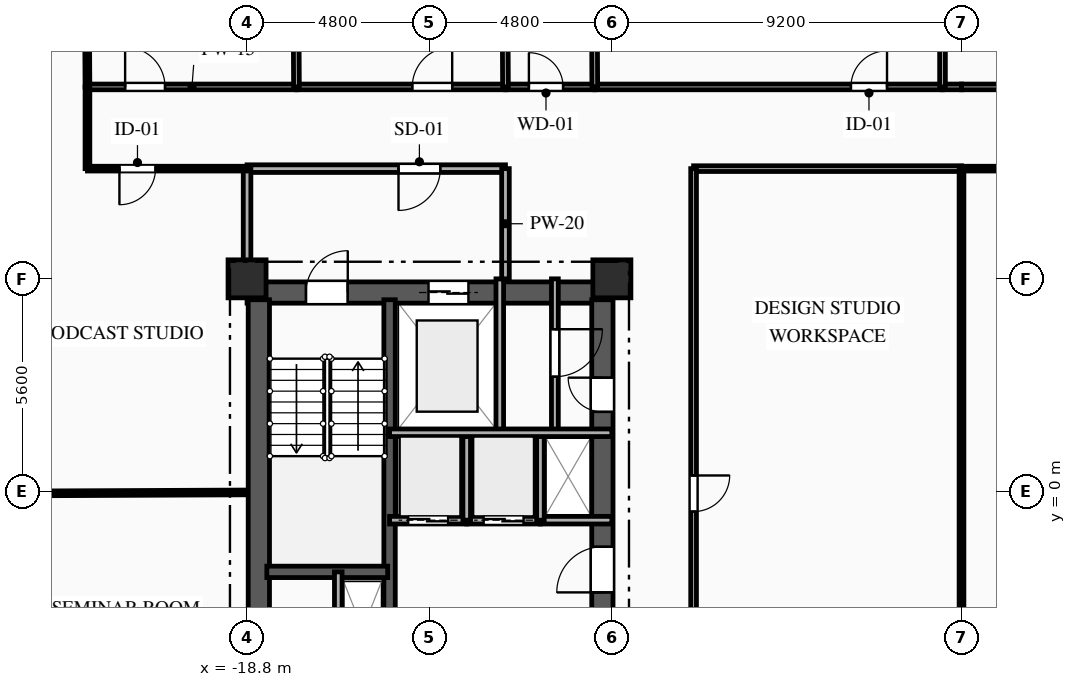
"""IFC4 building model, lengths in metres.
Left out: names, types, materials, properties, quantities, classifications, styles, units other than length and angle.
Written with IfcOpenShell. Run it as: python <this file> out.ifc"""

import sys

from ifc_helpers import new_model, si_unit, direction, frame, frame_2d, origin, origin_2d, place, context, subcontext, project, spatial, rectangle, extrude, element, fill, save


model = new_model("IFC4")
c1 = context("Model", 3, precision=1e-05, world=origin(), true_north=direction((0.0, 1.0)))
c2 = subcontext(c1, "Body", "Model", "MODEL_VIEW")
j1 = project(units=[si_unit("LENGTHUNIT", "METRE"), si_unit("PLANEANGLEUNIT", "RADIAN")], contexts=[c1])
p1 = place(None, origin())
s1 = spatial("IfcSite", under=j1, at=p1, CompositionType="ELEMENT")
p2 = place(p1, origin())
s2 = spatial("IfcBuilding", under=s1, at=p2, CompositionType="ELEMENT")
p3 = place(p2, frame((0.0, 0.0, 112.5)))
s3 = spatial("IfcBuildingStorey", under=s2, at=p3, CompositionType="ELEMENT", Elevation=112.5)
for number, where, z_axis, x_axis in (
    (1, (-18.8, 5.6, 0.0), (0.0, 0.0, 1.0), (1.0, 0.0, 0.0)),
    (2, (-9.2, 5.6, 0.0), (0.0, 0.0, 1.0), (1.0, 0.0, 0.0)),
):
    element("IfcColumn", number, at=place(p3, frame(where, z_axis=z_axis, x_axis=x_axis)), inside=s3, PredefinedType="COLUMN", context=c2, shape_type="SweptSolid", body=[
        extrude(rectangle(XDim=1.0, YDim=1.0, at=origin_2d()), origin(), (0.0, 0.0, 1.0), 3.35),
    ])
p4 = place(p3, frame((-18.8, 5.24, 0.0), z_axis=(0.0, 0.0, 1.0), x_axis=(1.0, 0.0, 0.0)))
e3 = element("IfcWall", 3, at=p4, inside=s3, PredefinedType="SHEAR", context=c2, shape_type="SweptSolid", body=[
    extrude(rectangle(XDim=9.6, YDim=0.56, at=frame_2d((4.8, 0.0))), origin(), (0.0, 0.0, 1.0), 3.045),
])
p5 = place(p4, frame((1.55, 0.0, 0.0)))
e4 = element("IfcOpeningElement", 4, at=p5, cuts=e3, PredefinedType="OPENING", context=c2, shape_type="SweptSolid", body=[
    extrude(rectangle(XDim=1.1, YDim=2.15, at=frame_2d((0.55, 1.075))), frame((0.0, 0.29, 0.0), z_axis=(0.0, -1.0, 0.0), x_axis=(1.0, 0.0, 0.0)), (0.0, 0.0, 1.0), 0.58),
])
p6 = place(p4, frame((4.775, 0.0, 0.0)))
e5 = element("IfcOpeningElement", 5, at=p6, cuts=e3, PredefinedType="OPENING", context=c2, shape_type="SweptSolid", body=[
    extrude(rectangle(XDim=1.05, YDim=2.1, at=frame_2d((0.525, 1.05))), frame((0.0, 0.29, 0.0), z_axis=(0.0, -1.0, 0.0), x_axis=(1.0, 0.0, 0.0)), (0.0, 0.0, 1.0), 0.58),
])
p7 = place(p3, frame((-18.49, -5.05, 0.0), z_axis=(0.0, 0.0, 1.0), x_axis=(0.0, 1.0, 0.0)))
e6 = element("IfcWall", 6, at=p7, inside=s3, PredefinedType="SHEAR", context=c2, shape_type="SweptSolid", body=[
    extrude(rectangle(XDim=10.1, YDim=0.56, at=frame_2d((5.05, 0.0))), origin(), (0.0, 0.0, 1.0), 3.045),
])
p8 = place(p3, frame((-9.45, -5.05, 0.0), z_axis=(0.0, 0.0, 1.0), x_axis=(0.0, 1.0, 0.0)))
e7 = element("IfcWall", 7, at=p8, inside=s3, PredefinedType="SHEAR", context=c2, shape_type="SweptSolid", body=[
    extrude(rectangle(XDim=10.1, YDim=0.56, at=frame_2d((5.05, 0.0))), origin(), (0.0, 0.0, 1.0), 3.045),
])
p9 = place(p8, frame((7.15, 0.0, 0.0)))
e8 = element("IfcOpeningElement", 8, at=p9, cuts=e7, PredefinedType="OPENING", context=c2, shape_type="SweptSolid", body=[
    extrude(rectangle(XDim=0.9, YDim=2.1, at=frame_2d((0.45, 1.05))), frame((0.0, 0.29, 0.0), z_axis=(0.0, -1.0, 0.0), x_axis=(1.0, 0.0, 0.0)), (0.0, 0.0, 1.0), 0.58),
])
p10 = place(p8, frame((2.4, 0.0, 0.0)))
e9 = element("IfcOpeningElement", 9, at=p10, cuts=e7, PredefinedType="OPENING", context=c2, shape_type="SweptSolid", body=[
    extrude(rectangle(XDim=1.2, YDim=2.15, at=frame_2d((0.6, 1.075))), frame((0.0, 0.29, 0.0), z_axis=(0.0, -1.0, 0.0), x_axis=(1.0, 0.0, 0.0)), (0.0, 0.0, 1.0), 0.58),
])
p11 = place(p3, frame((-15.05, -5.05, 0.0), z_axis=(0.0, 0.0, 1.0), x_axis=(0.0, 1.0, 0.0)))
e10 = element("IfcWall", 10, at=p11, inside=s3, PredefinedType="SHEAR", context=c2, shape_type="SweptSolid", body=[
    extrude(rectangle(XDim=10.1, YDim=0.3, at=frame_2d((5.05, 0.0))), origin(), (0.0, 0.0, 1.0), 3.045),
])
p12 = place(p3, frame((-18.28, -2.11, 0.0), z_axis=(0.0, 0.0, 1.0), x_axis=(1.0, 0.0, 0.0)))
e11 = element("IfcWall", 11, at=p12, inside=s3, PredefinedType="SHEAR", context=c2, shape_type="SweptSolid", body=[
    extrude(rectangle(XDim=3.18, YDim=0.3, at=frame_2d((1.59, 0.0))), origin(), (0.0, 0.0, 1.0), 3.045),
])
p13 = place(p3, frame((-16.4, -5.6, 0.0), z_axis=(0.0, 0.0, 1.0), x_axis=(0.0, 1.0, 0.0)))
e12 = element("IfcWall", 12, at=p13, inside=s3, PredefinedType="PARTITIONING", context=c2, shape_type="SweptSolid", body=[
    extrude(rectangle(XDim=3.49, YDim=0.2, at=frame_2d((1.745, 0.0))), origin(), (0.0, 0.0, 1.0), 3.045),
])
p14 = place(p3, frame((-12.15, 1.55, 0.0), z_axis=(0.0, 0.0, 1.0), x_axis=(0.0, 1.0, 0.0)))
e13 = element("IfcWall", 13, at=p14, inside=s3, PredefinedType="PARTITIONING", context=c2, shape_type="SweptSolid", body=[
    extrude(rectangle(XDim=4.05, YDim=0.2, at=frame_2d((2.025, 0.0))), origin(), (0.0, 0.0, 1.0), 3.045),
])
p15 = place(p3, frame((-12.0, 8.5, 0.0), z_axis=(0.0, 0.0, 1.0), x_axis=(-1.0, 0.0, 0.0)))
e14 = element("IfcWall", 14, at=p15, inside=s3, PredefinedType="PARTITIONING", context=c2, shape_type="SweptSolid", body=[
    extrude(rectangle(XDim=6.8, YDim=0.2, at=frame_2d((3.4, 0.0))), origin(), (0.0, 0.0, 1.0), 3.045),
])
p16 = place(p15, frame((1.715, 0.0, 0.0)))
e15 = element("IfcOpeningElement", 15, at=p16, cuts=e14, PredefinedType="OPENING", context=c2, shape_type="SweptSolid", body=[
    extrude(rectangle(XDim=1.1, YDim=2.15, at=frame_2d((0.55, 1.075))), frame((0.0, 0.11, 0.0), z_axis=(0.0, -1.0, 0.0), x_axis=(1.0, 0.0, 0.0)), (0.0, 0.0, 1.0), 0.22),
])
p17 = place(p3, frame((-12.0, 5.6, 0.0), z_axis=(0.0, 0.0, 1.0), x_axis=(0.0, 1.0, 0.0)))
e16 = element("IfcWall", 16, at=p17, inside=s3, PredefinedType="PARTITIONING", context=c2, shape_type="SweptSolid", body=[
    extrude(rectangle(XDim=2.9, YDim=0.2, at=frame_2d((1.45, 0.0))), origin(), (0.0, 0.0, 1.0), 3.045),
])
p18 = place(p3, frame((-18.8, 8.5, 0.0), z_axis=(0.0, 0.0, 1.0), x_axis=(0.0, -1.0, 0.0)))
e17 = element("IfcWall", 17, at=p18, inside=s3, PredefinedType="PARTITIONING", context=c2, shape_type="SweptSolid", body=[
    extrude(rectangle(XDim=2.9, YDim=0.2, at=frame_2d((1.45, 0.0))), origin(), (0.0, 0.0, 1.0), 2.53),
])
p19 = place(p3, frame((-10.7, 5.6, 0.0), z_axis=(0.0, 0.0, 1.0), x_axis=(0.0, -1.0, 0.0)))
e18 = element("IfcWall", 18, at=p19, inside=s3, PredefinedType="PARTITIONING", context=c2, shape_type="SweptSolid", body=[
    extrude(rectangle(XDim=4.05, YDim=0.18, at=frame_2d((2.025, 0.0))), origin(), (0.0, 0.0, 1.0), 3.045),
])
p20 = place(p19, frame((1.325, 0.0, 0.0)))
e19 = element("IfcOpeningElement", 19, at=p20, cuts=e18, PredefinedType="OPENING", context=c2, shape_type="SweptSolid", body=[
    extrude(rectangle(XDim=1.25, YDim=2.2, at=frame_2d((0.625, 1.1))), frame((0.0, 0.1, 0.0), z_axis=(0.0, -1.0, 0.0), x_axis=(1.0, 0.0, 0.0)), (0.0, 0.0, 1.0), 0.2),
])
p21 = place(p3, frame((-13.02, -0.75, 0.0), z_axis=(0.0, 0.0, 1.0), x_axis=(-1.0, 0.0, 0.0)))
e20 = element("IfcWall", 20, at=p21, inside=s3, PredefinedType="PARTITIONING", context=c2, shape_type="SweptSolid", body=[
    extrude(rectangle(XDim=2.03, YDim=0.2, at=frame_2d((1.015, 0.0))), origin(), (0.0, 0.0, 1.0), 3.045),
])
p22 = place(p21, frame((0.49, 0.0, 0.0)))
e21 = element("IfcOpeningElement", 21, at=p22, cuts=e20, PredefinedType="OPENING", context=c2, shape_type="SweptSolid", body=[
    extrude(rectangle(XDim=1.05, YDim=2.1, at=frame_2d((0.525, 1.05))), frame((0.0, 0.11, 0.0), z_axis=(0.0, -1.0, 0.0), x_axis=(1.0, 0.0, 0.0)), (0.0, 0.0, 1.0), 0.22),
])
p23 = place(p3, frame((-11.08, -0.75, 0.0), z_axis=(0.0, 0.0, 1.0), x_axis=(-1.0, 0.0, 0.0)))
e22 = element("IfcWall", 22, at=p23, inside=s3, PredefinedType="PARTITIONING", context=c2, shape_type="SweptSolid", body=[
    extrude(rectangle(XDim=1.94, YDim=0.2, at=frame_2d((0.97, 0.0))), origin(), (0.0, 0.0, 1.0), 3.045),
])
p24 = place(p23, frame((0.445, 0.0, 0.0)))
e23 = element("IfcOpeningElement", 23, at=p24, cuts=e22, PredefinedType="OPENING", context=c2, shape_type="SweptSolid", body=[
    extrude(rectangle(XDim=1.05, YDim=2.1, at=frame_2d((0.525, 1.05))), frame((0.0, 0.11, 0.0), z_axis=(0.0, -1.0, 0.0), x_axis=(1.0, 0.0, 0.0)), (0.0, 0.0, 1.0), 0.22),
])
p25 = place(p3, frame((-9.2, -0.75, 0.0), z_axis=(0.0, 0.0, 1.0), x_axis=(-1.0, 0.0, 0.0)))
e24 = element("IfcWall", 24, at=p25, inside=s3, PredefinedType="PARTITIONING", context=c2, shape_type="SweptSolid", body=[
    extrude(rectangle(XDim=1.88, YDim=0.2, at=frame_2d((0.94, 0.0))), origin(), (0.0, 0.0, 1.0), 3.045),
])
for number, where, z_axis, x_axis in (
    (25, (-13.02, -0.75, 0.0), (0.0, 0.0, 1.0), (0.0, 1.0, 0.0)),
    (26, (-11.08, -0.75, 0.0), (0.0, 0.0, 1.0), (0.0, 1.0, 0.0)),
):
    element("IfcWall", number, at=place(p3, frame(where, z_axis=z_axis, x_axis=x_axis)), inside=s3, PredefinedType="PARTITIONING", context=c2, shape_type="SweptSolid", body=[
        extrude(rectangle(XDim=2.3, YDim=0.2, at=frame_2d((1.15, 0.0))), origin(), (0.0, 0.0, 1.0), 3.045),
    ])
p26 = place(p3, frame((-18.8, 8.5, 0.0), z_axis=(0.0, 0.0, 1.0), x_axis=(-1.0, 0.0, 0.0)))
e27 = element("IfcWall", 27, at=p26, inside=s3, PredefinedType="PARTITIONING", context=c2, shape_type="SweptSolid", body=[
    extrude(rectangle(XDim=4.2, YDim=0.125, at=frame_2d((2.1, 0.0))), origin(), (0.0, 0.0, 1.0), 3.045),
])
p27 = place(p26, frame((2.409, 0.0, 0.0)))
e28 = element("IfcOpeningElement", 28, at=p27, cuts=e27, PredefinedType="OPENING", context=c2, shape_type="SweptSolid", body=[
    extrude(rectangle(XDim=0.95, YDim=2.1, at=frame_2d((0.475, 1.05))), frame((0.0, 0.073, 0.0), z_axis=(0.0, -1.0, 0.0), x_axis=(1.0, 0.0, 0.0)), (0.0, 0.0, 1.0), 0.145),
])
p28 = place(p3, frame((-23.0, 8.5, 0.0), z_axis=(0.0, 0.0, 1.0), x_axis=(0.0, 1.0, 0.0)))
e29 = element("IfcWall", 29, at=p28, inside=s3, PredefinedType="PARTITIONING", context=c2, shape_type="SweptSolid", body=[
    extrude(rectangle(XDim=2.15, YDim=0.125, at=frame_2d((1.075, 0.0))), origin(), (0.0, 0.0, 1.0), 3.045),
])
p29 = place(p3, frame((-23.0, 10.65, 0.0), z_axis=(0.0, 0.0, 1.0), x_axis=(1.0, 0.0, 0.0)))
e30 = element("IfcWall", 30, at=p29, inside=s3, PredefinedType="PARTITIONING", context=c2, shape_type="SweptSolid", body=[
    extrude(rectangle(XDim=5.5, YDim=0.15, at=frame_2d((2.75, 0.0))), origin(), (0.0, 0.0, 1.0), 3.045),
])
p30 = place(p29, frame((0.991, 0.0, 0.0)))
e31 = element("IfcOpeningElement", 31, at=p30, cuts=e30, PredefinedType="OPENING", context=c2, shape_type="SweptSolid", body=[
    extrude(rectangle(XDim=1.05, YDim=2.15, at=frame_2d((0.525, 1.075))), frame((0.0, 0.085, 0.0), z_axis=(0.0, -1.0, 0.0), x_axis=(1.0, 0.0, 0.0)), (0.0, 0.0, 1.0), 0.17),
])
p31 = place(p3, frame((-17.5, 10.65, 0.0), z_axis=(0.0, 0.0, 1.0), x_axis=(1.0, 0.0, 0.0)))
e32 = element("IfcWall", 32, at=p31, inside=s3, PredefinedType="PARTITIONING", context=c2, shape_type="SweptSolid", body=[
    extrude(rectangle(XDim=5.5, YDim=0.15, at=frame_2d((2.75, 0.0))), origin(), (0.0, 0.0, 1.0), 3.045),
])
p32 = place(p31, frame((3.048, 0.0, 0.0)))
e33 = element("IfcOpeningElement", 33, at=p32, cuts=e32, PredefinedType="OPENING", context=c2, shape_type="SweptSolid", body=[
    extrude(rectangle(XDim=1.05, YDim=2.15, at=frame_2d((0.525, 1.075))), frame((0.0, 0.085, 0.0), z_axis=(0.0, -1.0, 0.0), x_axis=(1.0, 0.0, 0.0)), (0.0, 0.0, 1.0), 0.17),
])
p33 = place(p3, frame((-12.0, 10.65, 0.0), z_axis=(0.0, 0.0, 1.0), x_axis=(1.0, 0.0, 0.0)))
e34 = element("IfcWall", 34, at=p33, inside=s3, PredefinedType="PLUMBINGWALL", context=c2, shape_type="SweptSolid", body=[
    extrude(rectangle(XDim=2.35, YDim=0.15, at=frame_2d((1.175, 0.0))), origin(), (0.0, 0.0, 1.0), 3.045),
])
p34 = place(p33, frame((0.616, 0.0, 0.0)))
e35 = element("IfcOpeningElement", 35, at=p34, cuts=e34, PredefinedType="OPENING", context=c2, shape_type="SweptSolid", body=[
    extrude(rectangle(XDim=0.9, YDim=2.1, at=frame_2d((0.45, 1.05))), frame((0.0, 0.085, 0.0), z_axis=(0.0, -1.0, 0.0), x_axis=(1.0, 0.0, 0.0)), (0.0, 0.0, 1.0), 0.17),
])
p35 = place(p3, frame((-9.65, 10.65, 0.0), z_axis=(0.0, 0.0, 1.0), x_axis=(1.0, 0.0, 0.0)))
e36 = element("IfcWall", 36, at=p35, inside=s3, PredefinedType="PARTITIONING", context=c2, shape_type="SweptSolid", body=[
    extrude(rectangle(XDim=9.15, YDim=0.15, at=frame_2d((4.575, 0.0))), origin(), (0.0, 0.0, 1.0), 3.045),
])
p36 = place(p35, frame((6.74, 0.0, 0.0)))
e37 = element("IfcOpeningElement", 37, at=p36, cuts=e36, PredefinedType="OPENING", context=c2, shape_type="SweptSolid", body=[
    extrude(rectangle(XDim=0.95, YDim=2.1, at=frame_2d((0.475, 1.05))), frame((0.0, 0.085, 0.0), z_axis=(0.0, -1.0, 0.0), x_axis=(1.0, 0.0, 0.0)), (0.0, 0.0, 1.0), 0.17),
])
p37 = place(p3, frame((-0.5, 10.65, 0.0), z_axis=(0.0, 0.0, 1.0), x_axis=(1.0, 0.0, 0.0)))
e38 = element("IfcWall", 38, at=p37, inside=s3, PredefinedType="PLUMBINGWALL", context=c2, shape_type="SweptSolid", body=[
    extrude(rectangle(XDim=0.5, YDim=0.15, at=frame_2d((0.25, 0.0))), origin(), (0.0, 0.0, 1.0), 3.045),
])
p38 = place(p3, frame((0.0, 8.5, 0.0), z_axis=(0.0, 0.0, 1.0), x_axis=(-1.0, 0.0, 0.0)))
e39 = element("IfcWall", 39, at=p38, inside=s3, PredefinedType="PARTITIONING", context=c2, shape_type="SweptSolid", body=[
    extrude(rectangle(XDim=7.05, YDim=0.15, at=frame_2d((3.525, 0.0))), origin(), (0.0, 0.0, 1.0), 3.045),
])
p39 = place(p3, frame((0.0, 10.65, 0.0), z_axis=(0.0, 0.0, 1.0), x_axis=(1.0, 0.0, 0.0)))
e40 = element("IfcWall", 40, at=p39, inside=s3, PredefinedType="PLUMBINGWALL", context=c2, shape_type="SweptSolid", body=[
    extrude(rectangle(XDim=1.95, YDim=0.15, at=frame_2d((0.975, 0.0))), origin(), (0.0, 0.0, 1.0), 3.045),
])
p40 = place(p3, frame((7.05, 8.5, 0.0), z_axis=(0.0, 0.0, 1.0), x_axis=(-1.0, 0.0, 0.0)))
e41 = element("IfcWall", 41, at=p40, inside=s3, PredefinedType="PARTITIONING", context=c2, shape_type="SweptSolid", body=[
    extrude(rectangle(XDim=7.05, YDim=0.125, at=frame_2d((3.525, 0.0))), origin(), (0.0, 0.0, 1.0), 3.045),
])
p41 = place(p3, frame((-7.05, 8.5, 0.0), z_axis=(0.0, 0.0, 1.0), x_axis=(0.0, -1.0, 0.0)))
e42 = element("IfcWall", 42, at=p41, inside=s3, PredefinedType="PARTITIONING", context=c2, shape_type="SweptSolid", body=[
    extrude(rectangle(XDim=14.1, YDim=0.15, at=frame_2d((7.05, 0.0))), origin(), (0.0, 0.0, 1.0), 3.045),
])
p42 = place(p41, frame((8.074, 0.0, 0.0)))
e43 = element("IfcOpeningElement", 43, at=p42, cuts=e42, PredefinedType="OPENING", context=c2, shape_type="SweptSolid", body=[
    extrude(rectangle(XDim=0.95, YDim=2.1, at=frame_2d((0.475, 1.05))), frame((0.0, 0.085, 0.0), z_axis=(0.0, -1.0, 0.0), x_axis=(1.0, 0.0, 0.0)), (0.0, 0.0, 1.0), 0.17),
])
p43 = place(p3, frame((-28.671, -0.064, 0.0), z_axis=(0.0, 0.0, 1.0), x_axis=(0.999990089865, 0.004451985263, 0.0)))
e44 = element("IfcWall", 44, at=p43, inside=s3, PredefinedType="PARTITIONING", context=c2, shape_type="SweptSolid", body=[
    extrude(rectangle(XDim=9.871, YDim=0.125, at=frame_2d((4.936, 0.0))), origin(), (0.0, 0.0, 1.0), 3.045),
])
p44 = place(p3, frame((-23.044, 18.013, 0.0), z_axis=(0.0, 0.0, 1.0), x_axis=(0.005968459246, -0.999982188588, 0.0)))
e45 = element("IfcWall", 45, at=p44, inside=s3, PredefinedType="PARTITIONING", context=c2, shape_type="SweptSolid", body=[
    extrude(rectangle(XDim=7.363, YDim=0.125, at=frame_2d((3.682, 0.0))), origin(), (0.0, 0.0, 1.0), 3.045),
])
p45 = place(p3, frame((-17.544, 18.591, 0.0), z_axis=(0.0, 0.0, 1.0), x_axis=(0.005533949572, -0.999984687584, 0.0)))
e46 = element("IfcWall", 46, at=p45, inside=s3, PredefinedType="PARTITIONING", context=c2, shape_type="SweptSolid", body=[
    extrude(rectangle(XDim=7.941, YDim=0.15, at=frame_2d((3.97, 0.0))), origin(), (0.0, 0.0, 1.0), 2.53),
])
p46 = place(p3, frame((-12.044, 19.169, 0.0), z_axis=(0.0, 0.0, 1.0), x_axis=(0.005158411336, -0.999986695308, 0.0)))
e47 = element("IfcWall", 47, at=p46, inside=s3, PredefinedType="PLUMBINGWALL", context=c2, shape_type="SweptSolid", body=[
    extrude(rectangle(XDim=8.519, YDim=0.15, at=frame_2d((4.26, 0.0))), origin(), (0.0, 0.0, 1.0), 3.045),
])
p47 = place(p3, frame((-9.694, 19.416, 0.0), z_axis=(0.0, 0.0, 1.0), x_axis=(0.005013026743, -0.999987434702, 0.0)))
e48 = element("IfcWall", 48, at=p47, inside=s3, PredefinedType="PLUMBINGWALL", context=c2, shape_type="SweptSolid", body=[
    extrude(rectangle(XDim=8.766, YDim=0.15, at=frame_2d((4.383, 0.0))), origin(), (0.0, 0.0, 1.0), 3.045),
])
p48 = place(p3, frame((-0.5, 12.8, 0.0), z_axis=(0.0, 0.0, 1.0), x_axis=(0.0, -1.0, 0.0)))
e49 = element("IfcWall", 49, at=p48, inside=s3, PredefinedType="PLUMBINGWALL", context=c2, shape_type="SweptSolid", body=[
    extrude(rectangle(XDim=2.15, YDim=0.15, at=frame_2d((1.075, 0.0))), origin(), (0.0, 0.0, 1.0), 3.045),
])
p49 = place(p3, frame((0.0, 8.5, 0.0), z_axis=(0.0, 0.0, 1.0), x_axis=(0.0, -1.0, 0.0)))
e50 = element("IfcWall", 50, at=p49, inside=s3, PredefinedType="PARTITIONING", context=c2, shape_type="SweptSolid", body=[
    extrude(rectangle(XDim=14.1, YDim=0.125, at=frame_2d((7.05, 0.0))), origin(), (0.0, 0.0, 1.0), 3.045),
])
p50 = place(p3, frame((-15.05, 1.55, 0.0), z_axis=(0.0, 0.0, 1.0), x_axis=(1.0, 0.0, 0.0)))
e51 = element("IfcWall", 51, at=p50, inside=s3, PredefinedType="PARTITIONING", context=c2, shape_type="SweptSolid", body=[
    extrude(rectangle(XDim=5.85, YDim=0.2, at=frame_2d((2.925, 0.0))), origin(), (0.0, 0.0, 1.0), 3.045),
])
p51 = place(p5, origin())
e52 = element("IfcDoor", 52, at=p51, inside=s3, OperationType="SINGLE_SWING_RIGHT", PredefinedType="DOOR", context=c2, shape_type="SweptSolid", body=[
    extrude(rectangle(XDim=1.1, YDim=2.15, at=frame_2d((0.55, 1.075))), frame((0.0, 0.025, 0.0), z_axis=(0.0, -1.0, 0.0), x_axis=(1.0, 0.0, 0.0)), (0.0, 0.0, 1.0), 0.05),
])
fill(e4, e52)
p52 = place(p6, origin())
e53 = element("IfcDoor", 53, at=p52, inside=s3, OperationType="DOUBLE_DOOR_SLIDING", PredefinedType="DOOR", context=c2, shape_type="SweptSolid", body=[
    extrude(rectangle(XDim=1.05, YDim=2.1, at=frame_2d((0.525, 1.05))), frame((0.0, 0.025, 0.0), z_axis=(0.0, -1.0, 0.0), x_axis=(1.0, 0.0, 0.0)), (0.0, 0.0, 1.0), 0.05),
])
fill(e5, e53)
p53 = place(p16, origin())
e54 = element("IfcDoor", 54, at=p53, inside=s3, OperationType="SINGLE_SWING_RIGHT", PredefinedType="DOOR", context=c2, shape_type="SweptSolid", body=[
    extrude(rectangle(XDim=1.1, YDim=2.15, at=frame_2d((0.55, 1.075))), frame((0.0, 0.025, 0.0), z_axis=(0.0, -1.0, 0.0), x_axis=(1.0, 0.0, 0.0)), (0.0, 0.0, 1.0), 0.05),
])
fill(e15, e54)
p54 = place(p20, origin())
e55 = element("IfcDoor", 55, at=p54, inside=s3, OperationType="SINGLE_SWING_LEFT", PredefinedType="DOOR", context=c2, shape_type="SweptSolid", body=[
    extrude(rectangle(XDim=1.25, YDim=2.2, at=frame_2d((0.625, 1.1))), frame((0.0, 0.025, 0.0), z_axis=(0.0, -1.0, 0.0), x_axis=(1.0, 0.0, 0.0)), (0.0, 0.0, 1.0), 0.05),
])
fill(e19, e55)
p55 = place(p9, origin())
e56 = element("IfcDoor", 56, at=p55, inside=s3, OperationType="SINGLE_SWING_RIGHT", PredefinedType="DOOR", context=c2, shape_type="SweptSolid", body=[
    extrude(rectangle(XDim=0.9, YDim=2.1, at=frame_2d((0.45, 1.05))), frame((0.0, 0.025, 0.0), z_axis=(0.0, -1.0, 0.0), x_axis=(1.0, 0.0, 0.0)), (0.0, 0.0, 1.0), 0.05),
])
fill(e8, e56)
p56 = place(p22, origin())
e57 = element("IfcDoor", 57, at=p56, inside=s3, OperationType="DOUBLE_DOOR_SLIDING", PredefinedType="DOOR", context=c2, shape_type="SweptSolid", body=[
    extrude(rectangle(XDim=1.05, YDim=2.1, at=frame_2d((0.525, 1.05))), frame((0.0, 0.025, 0.0), z_axis=(0.0, -1.0, 0.0), x_axis=(1.0, 0.0, 0.0)), (0.0, 0.0, 1.0), 0.05),
])
fill(e21, e57)
p57 = place(p24, origin())
e58 = element("IfcDoor", 58, at=p57, inside=s3, OperationType="DOUBLE_DOOR_SLIDING", PredefinedType="DOOR", context=c2, shape_type="SweptSolid", body=[
    extrude(rectangle(XDim=1.05, YDim=2.1, at=frame_2d((0.525, 1.05))), frame((0.0, 0.025, 0.0), z_axis=(0.0, -1.0, 0.0), x_axis=(1.0, 0.0, 0.0)), (0.0, 0.0, 1.0), 0.05),
])
fill(e23, e58)
p58 = place(p10, origin())
e59 = element("IfcDoor", 59, at=p58, inside=s3, OperationType="SINGLE_SWING_LEFT", PredefinedType="DOOR", context=c2, shape_type="SweptSolid", body=[
    extrude(rectangle(XDim=1.2, YDim=2.15, at=frame_2d((0.6, 1.075))), frame((0.0, 0.025, 0.0), z_axis=(0.0, -1.0, 0.0), x_axis=(1.0, 0.0, 0.0)), (0.0, 0.0, 1.0), 0.05),
])
fill(e9, e59)
p59 = place(p27, origin())
e60 = element("IfcDoor", 60, at=p59, inside=s3, OperationType="SINGLE_SWING_RIGHT", PredefinedType="DOOR", context=c2, shape_type="SweptSolid", body=[
    extrude(rectangle(XDim=0.95, YDim=2.1, at=frame_2d((0.475, 1.05))), frame((0.0, 0.025, 0.0), z_axis=(0.0, -1.0, 0.0), x_axis=(1.0, 0.0, 0.0)), (0.0, 0.0, 1.0), 0.05),
])
fill(e28, e60)
p60 = place(p30, origin())
e61 = element("IfcDoor", 61, at=p60, inside=s3, OperationType="SINGLE_SWING_LEFT", PredefinedType="DOOR", context=c2, shape_type="SweptSolid", body=[
    extrude(rectangle(XDim=1.05, YDim=2.15, at=frame_2d((0.525, 1.075))), frame((0.0, 0.025, 0.0), z_axis=(0.0, -1.0, 0.0), x_axis=(1.0, 0.0, 0.0)), (0.0, 0.0, 1.0), 0.05),
])
fill(e31, e61)
p61 = place(p32, origin())
e62 = element("IfcDoor", 62, at=p61, inside=s3, OperationType="SINGLE_SWING_RIGHT", PredefinedType="DOOR", context=c2, shape_type="SweptSolid", body=[
    extrude(rectangle(XDim=1.05, YDim=2.15, at=frame_2d((0.525, 1.075))), frame((0.0, 0.025, 0.0), z_axis=(0.0, -1.0, 0.0), x_axis=(1.0, 0.0, 0.0)), (0.0, 0.0, 1.0), 0.05),
])
fill(e33, e62)
p62 = place(p34, origin())
e63 = element("IfcDoor", 63, at=p62, inside=s3, OperationType="SINGLE_SWING_LEFT", PredefinedType="DOOR", context=c2, shape_type="SweptSolid", body=[
    extrude(rectangle(XDim=0.9, YDim=2.1, at=frame_2d((0.45, 1.05))), frame((0.0, 0.025, 0.0), z_axis=(0.0, -1.0, 0.0), x_axis=(1.0, 0.0, 0.0)), (0.0, 0.0, 1.0), 0.05),
])
fill(e35, e63)
p63 = place(p36, origin())
e64 = element("IfcDoor", 64, at=p63, inside=s3, OperationType="SINGLE_SWING_RIGHT", PredefinedType="DOOR", context=c2, shape_type="SweptSolid", body=[
    extrude(rectangle(XDim=0.95, YDim=2.1, at=frame_2d((0.475, 1.05))), frame((0.0, 0.025, 0.0), z_axis=(0.0, -1.0, 0.0), x_axis=(1.0, 0.0, 0.0)), (0.0, 0.0, 1.0), 0.05),
])
fill(e37, e64)
p64 = place(p42, origin())
e65 = element("IfcDoor", 65, at=p64, inside=s3, OperationType="SINGLE_SWING_LEFT", PredefinedType="DOOR", context=c2, shape_type="SweptSolid", body=[
    extrude(rectangle(XDim=0.95, YDim=2.1, at=frame_2d((0.475, 1.05))), frame((0.0, 0.025, 0.0), z_axis=(0.0, -1.0, 0.0), x_axis=(1.0, 0.0, 0.0)), (0.0, 0.0, 1.0), 0.05),
])
fill(e43, e65)
save(model, sys.argv[1])
